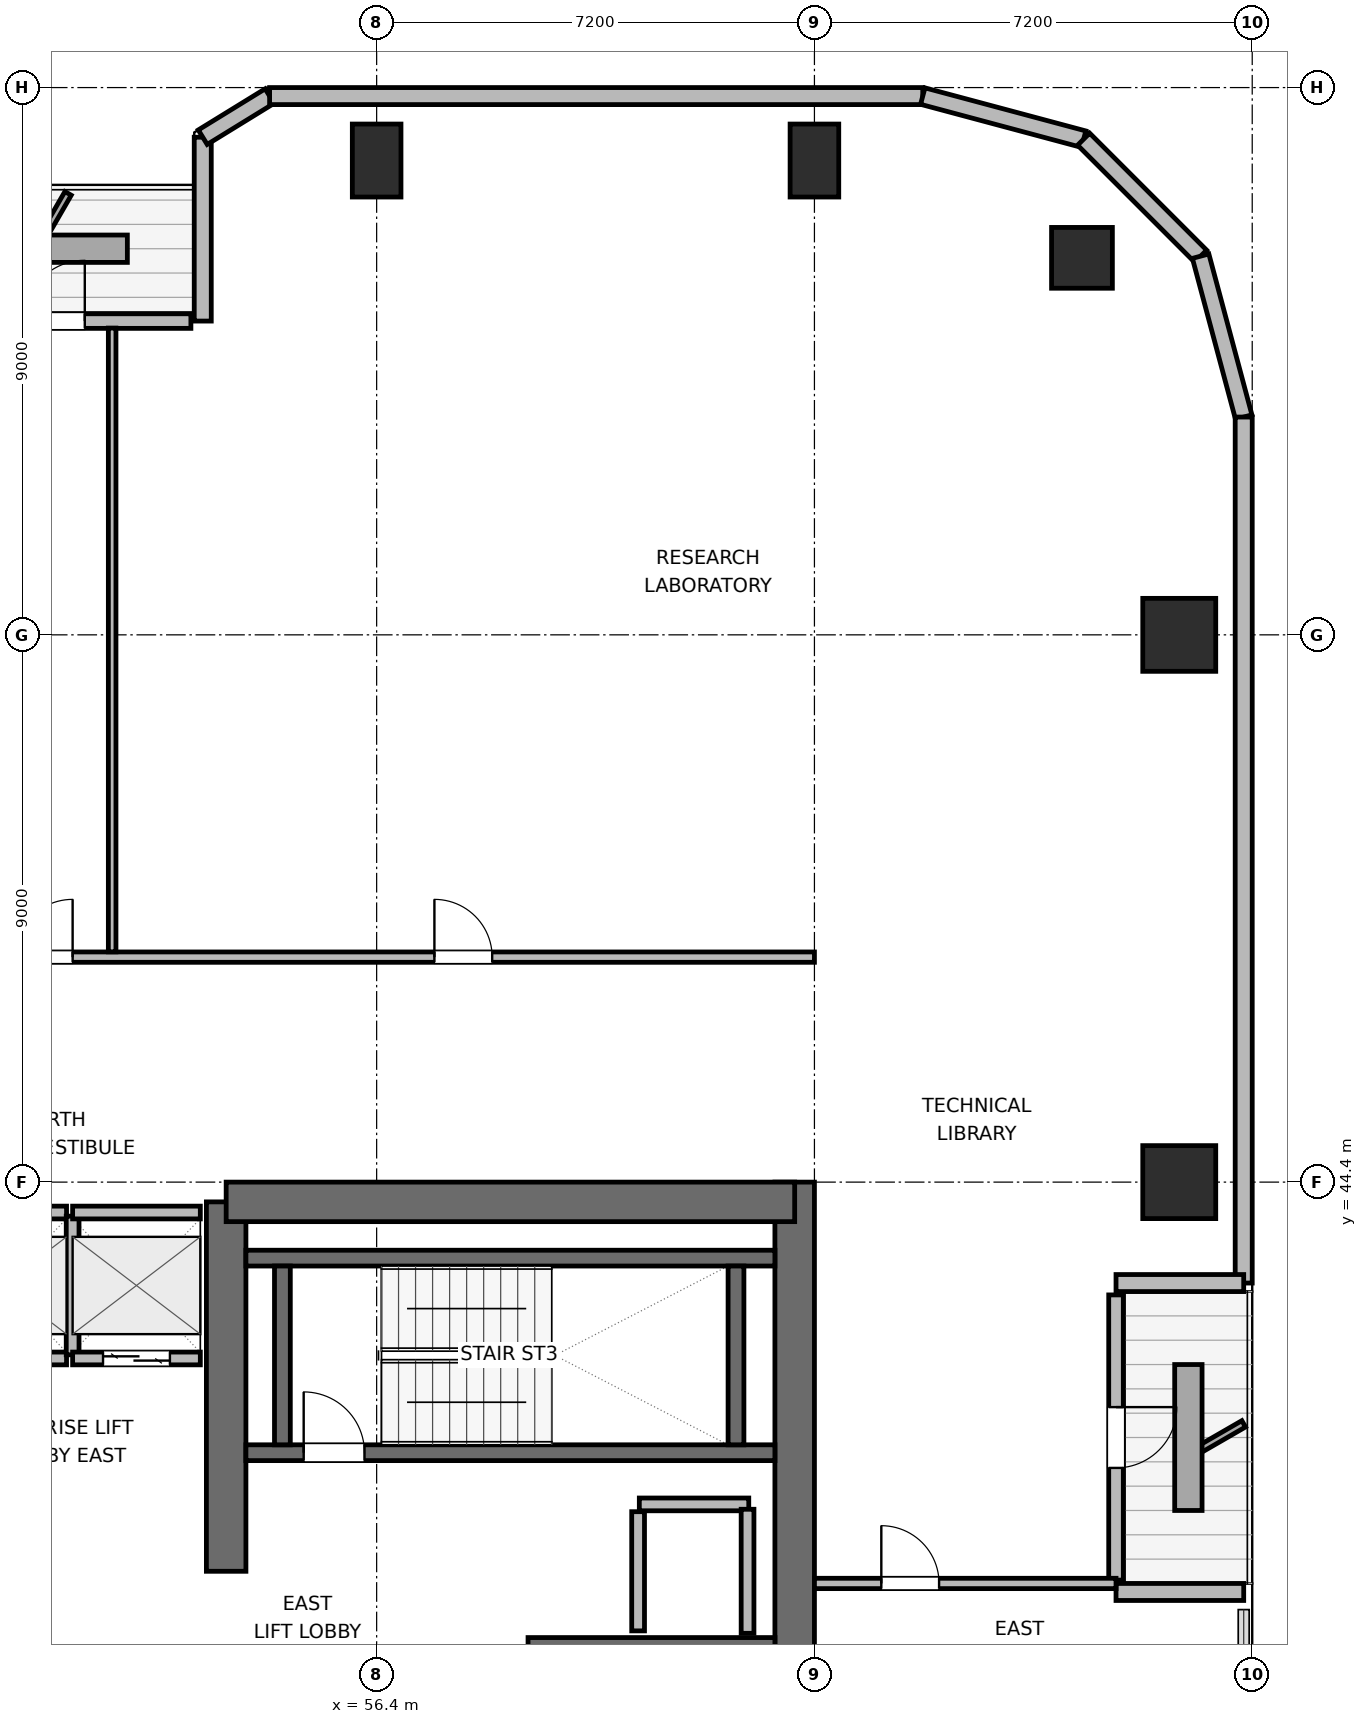
"""IFC4 building model, lengths in metres.
Left out: names, types, materials, properties, quantities, classifications, styles, units other than length and angle.
Written with IfcOpenShell. Run it as: python <this file> out.ifc"""

import sys

from ifc_helpers import new_model, si_unit, direction, frame, frame_2d, origin, origin_2d, place, context, subcontext, project, spatial, rectangle, circle, extrude, element, fill, save


model = new_model("IFC4")
c1 = context("Model", 3, precision=1e-05, world=origin(), true_north=direction((0.0, 1.0)))
c2 = subcontext(c1, "Body", "Model", "MODEL_VIEW")
j1 = project(units=[si_unit("LENGTHUNIT", "METRE"), si_unit("PLANEANGLEUNIT", "RADIAN")], contexts=[c1])
p1 = place(None, origin())
s1 = spatial("IfcSite", under=j1, at=p1, CompositionType="ELEMENT")
p2 = place(p1, origin())
s2 = spatial("IfcBuilding", under=s1, at=p2, CompositionType="ELEMENT")
p3 = place(p2, frame((0.0, 0.0, 201.9)))
s3 = spatial("IfcBuildingStorey", under=s2, at=p3, CompositionType="ELEMENT", Elevation=201.9)
p4 = place(p3, frame((53.925, 38.0, 0.0), z_axis=(0.0, 0.0, 1.0), x_axis=(0.0, 1.0, 0.0)))
e1 = element("IfcWall", 1, at=p4, inside=s3, PredefinedType="SHEAR", context=c2, shape_type="SweptSolid", body=[
    extrude(rectangle(XDim=6.075, YDim=0.65, at=frame_2d((3.038, 0.0))), origin(), (0.0, 0.0, 1.0), 3.9),
])
p5 = place(p3, frame((63.275, 27.6, 0.0), z_axis=(0.0, 0.0, 1.0), x_axis=(0.0, 1.0, 0.0)))
e2 = element("IfcWall", 2, at=p5, inside=s3, PredefinedType="SHEAR", context=c2, shape_type="SweptSolid", body=[
    extrude(rectangle(XDim=16.8, YDim=0.65, at=frame_2d((8.4, 0.0))), origin(), (0.0, 0.0, 1.0), 3.9),
])
p6 = place(p3, frame((53.925, 44.075, 0.0), z_axis=(0.0, 0.0, 1.0), x_axis=(1.0, 0.0, 0.0)))
e3 = element("IfcWall", 3, at=p6, inside=s3, PredefinedType="SHEAR", context=c2, shape_type="SweptSolid", body=[
    extrude(rectangle(XDim=9.35, YDim=0.65, at=frame_2d((4.675, 0.0))), origin(), (0.0, 0.0, 1.0), 3.9),
])
p7 = place(p3, frame((58.89, 36.78, 0.0), z_axis=(0.0, 0.0, 1.0), x_axis=(1.0, 0.0, 0.0)))
e4 = element("IfcWall", 4, at=p7, inside=s3, PredefinedType="SHEAR", context=c2, shape_type="SweptSolid", body=[
    extrude(rectangle(XDim=4.06, YDim=0.26, at=frame_2d((2.03, 0.0))), origin(), (0.0, 0.0, 1.0), 3.9),
])
p8 = place(p3, frame((54.25, 39.95, 0.0), z_axis=(0.0, 0.0, 1.0), x_axis=(1.0, 0.0, 0.0)))
e5 = element("IfcWall", 5, at=p8, inside=s3, PredefinedType="SHEAR", context=c2, shape_type="SweptSolid", body=[
    extrude(rectangle(XDim=8.7, YDim=0.26, at=frame_2d((4.35, 0.0))), origin(), (0.0, 0.0, 1.0), 3.9),
])
p9 = place(p8, frame((0.95, 0.0, 0.0)))
e6 = element("IfcOpeningElement", 6, at=p9, cuts=e5, PredefinedType="OPENING", context=c2, shape_type="SweptSolid", body=[
    extrude(rectangle(XDim=1.0, YDim=2.04, at=frame_2d((0.5, 1.02))), frame((0.0, 0.14, 0.0), z_axis=(0.0, -1.0, 0.0), x_axis=(1.0, 0.0, 0.0)), (0.0, 0.0, 1.0), 0.28),
])
p10 = place(p3, frame((54.25, 43.15, 0.0), z_axis=(0.0, 0.0, 1.0), x_axis=(1.0, 0.0, 0.0)))
e7 = element("IfcWall", 7, at=p10, inside=s3, PredefinedType="SHEAR", context=c2, shape_type="SweptSolid", body=[
    extrude(rectangle(XDim=8.7, YDim=0.26, at=frame_2d((4.35, 0.0))), origin(), (0.0, 0.0, 1.0), 3.9),
])
for number, where, z_axis, x_axis in (
    (8, (54.85, 40.08, 0.0), (0.0, 0.0, 1.0), (0.0, 1.0, 0.0)),
    (9, (62.31, 40.08, 0.0), (0.0, 0.0, 1.0), (0.0, 1.0, 0.0)),
):
    element("IfcWall", number, at=place(p3, frame(where, z_axis=z_axis, x_axis=x_axis)), inside=s3, PredefinedType="SHEAR", context=c2, shape_type="SweptSolid", body=[
        extrude(rectangle(XDim=2.94, YDim=0.26, at=frame_2d((1.47, 0.0))), origin(), (0.0, 0.0, 1.0), 3.9),
    ])
p11 = place(p3, frame((68.0, 59.6, 0.0), z_axis=(0.0, 0.0, 1.0), x_axis=(1.0, 0.0, 0.0)))
e10 = element("IfcColumn", 10, at=p11, inside=s3, PredefinedType="COLUMN", context=c2, shape_type="SweptSolid", body=[
    extrude(circle(Radius=0.5, at=origin_2d()), origin(), (0.0, 0.0, 1.0), 3.9),
])
for number, where, z_axis, x_axis in (
    (11, (56.4, 61.2, 0.0), (0.0, 0.0, 1.0), (1.0, 0.0, 0.0)),
    (12, (63.6, 61.2, 0.0), (0.0, 0.0, 1.0), (1.0, 0.0, 0.0)),
):
    element("IfcColumn", number, at=place(p3, frame(where, z_axis=z_axis, x_axis=x_axis)), inside=s3, PredefinedType="COLUMN", context=c2, shape_type="SweptSolid", body=[
        extrude(rectangle(XDim=0.8, YDim=1.2, at=origin_2d()), origin(), (0.0, 0.0, 1.0), 3.9),
    ])
for number, where, z_axis, x_axis in (
    (13, (69.6, 44.4, 0.0), (0.0, 0.0, 1.0), (1.0, 0.0, 0.0)),
    (14, (69.6, 53.4, 0.0), (0.0, 0.0, 1.0), (1.0, 0.0, 0.0)),
):
    element("IfcColumn", number, at=place(p3, frame(where, z_axis=z_axis, x_axis=x_axis)), inside=s3, PredefinedType="COLUMN", context=c2, shape_type="SweptSolid", body=[
        extrude(rectangle(XDim=1.2, YDim=1.2, at=origin_2d()), origin(), (0.0, 0.0, 1.0), 3.9),
    ])
p12 = place(p3, frame((48.855, 58.56, 0.0), z_axis=(0.0, 0.0, 1.0), x_axis=(1.0, 0.0, 0.0)))
e15 = element("IfcWall", 15, at=p12, inside=s3, PredefinedType="SOLIDWALL", context=c2, shape_type="SweptSolid", body=[
    extrude(rectangle(XDim=4.49, YDim=0.24, at=frame_2d((2.245, 0.0))), origin(), (0.0, 0.0, 1.0), 3.68),
])
p13 = place(p12, frame((1.745, 0.0, 0.0)))
e16 = element("IfcOpeningElement", 16, at=p13, cuts=e15, PredefinedType="OPENING", context=c2, shape_type="SweptSolid", body=[
    extrude(rectangle(XDim=1.0, YDim=2.02, at=frame_2d((0.5, 1.01))), frame((0.0, 0.13, 0.0), z_axis=(0.0, -1.0, 0.0), x_axis=(1.0, 0.0, 0.0)), (0.0, 0.0, 1.0), 0.26),
])
p14 = place(p3, frame((53.54, 58.56, 0.0), z_axis=(0.0, 0.0, 1.0), x_axis=(0.0, 1.0, 0.0)))
e17 = element("IfcWall", 17, at=p14, inside=s3, PredefinedType="SOLIDWALL", context=c2, shape_type="SweptSolid", body=[
    extrude(rectangle(XDim=3.024, YDim=0.28, at=frame_2d((1.512, 0.0))), origin(), (0.0, 0.0, 1.0), 2.265),
])
p15 = place(p3, frame((53.54, 61.584, 0.0), z_axis=(0.0, 0.0, 1.0), x_axis=(0.851801140441, 0.523865266212, 0.0)))
e18 = element("IfcWall", 18, at=p15, inside=s3, PredefinedType="SOLIDWALL", context=c2, shape_type="SweptSolid", body=[
    extrude(rectangle(XDim=1.291, YDim=0.28, at=frame_2d((0.646, 0.0))), origin(), (0.0, 0.0, 1.0), 3.68),
])
p16 = place(p3, frame((54.64, 62.26, 0.0), z_axis=(0.0, 0.0, 1.0), x_axis=(1.0, 0.0, 0.0)))
e19 = element("IfcWall", 19, at=p16, inside=s3, PredefinedType="SOLIDWALL", context=c2, shape_type="SweptSolid", body=[
    extrude(rectangle(XDim=10.742, YDim=0.28, at=frame_2d((5.371, 0.0))), origin(), (0.0, 0.0, 1.0), 3.68),
])
p17 = place(p3, frame((65.382, 62.26, 0.0), z_axis=(0.0, 0.0, 1.0), x_axis=(0.965971118627, -0.258649952598, 0.0)))
e20 = element("IfcWall", 20, at=p17, inside=s3, PredefinedType="SOLIDWALL", context=c2, shape_type="SweptSolid", body=[
    extrude(rectangle(XDim=2.739, YDim=0.28, at=frame_2d((1.37, 0.0))), origin(), (0.0, 0.0, 1.0), 3.68),
])
p18 = place(p3, frame((68.028, 61.552, 0.0), z_axis=(0.0, 0.0, 1.0), x_axis=(0.707061915429, -0.707151644098, 0.0)))
e21 = element("IfcWall", 21, at=p18, inside=s3, PredefinedType="SOLIDWALL", context=c2, shape_type="SweptSolid", body=[
    extrude(rectangle(XDim=2.721, YDim=0.28, at=frame_2d((1.36, 0.0))), origin(), (0.0, 0.0, 1.0), 3.68),
])
p19 = place(p3, frame((69.951, 59.627, 0.0), z_axis=(0.0, 0.0, 1.0), x_axis=(0.258672222976, -0.9659651552, 0.0)))
e22 = element("IfcWall", 22, at=p19, inside=s3, PredefinedType="SOLIDWALL", context=c2, shape_type="SweptSolid", body=[
    extrude(rectangle(XDim=2.739, YDim=0.28, at=frame_2d((1.37, 0.0))), origin(), (0.0, 0.0, 1.0), 3.68),
])
p20 = place(p3, frame((70.66, 56.982, 0.0), z_axis=(0.0, 0.0, 1.0), x_axis=(0.0, -1.0, 0.0)))
e23 = element("IfcWall", 23, at=p20, inside=s3, PredefinedType="SOLIDWALL", context=c2, shape_type="SweptSolid", body=[
    extrude(rectangle(XDim=14.242, YDim=0.28, at=frame_2d((7.121, 0.0))), origin(), (0.0, 0.0, 1.0), 3.68),
])
p21 = place(p3, frame((70.66, 42.74, 0.0), z_axis=(0.0, 0.0, 1.0), x_axis=(-1.0, 0.0, 0.0)))
e24 = element("IfcWall", 24, at=p21, inside=s3, PredefinedType="SOLIDWALL", context=c2, shape_type="SweptSolid", body=[
    extrude(rectangle(XDim=2.1, YDim=0.28, at=frame_2d((1.05, 0.0))), origin(), (0.0, 0.0, 1.0), 3.116),
])
p22 = place(p3, frame((68.56, 42.545, 0.0), z_axis=(0.0, 0.0, 1.0), x_axis=(0.0, -1.0, 0.0)))
e25 = element("IfcWall", 25, at=p22, inside=s3, PredefinedType="SOLIDWALL", context=c2, shape_type="SweptSolid", body=[
    extrude(rectangle(XDim=4.69, YDim=0.24, at=frame_2d((2.345, 0.0))), origin(), (0.0, 0.0, 1.0), 3.248),
])
p23 = place(p22, frame((1.845, 0.0, 0.0)))
e26 = element("IfcOpeningElement", 26, at=p23, cuts=e25, PredefinedType="OPENING", context=c2, shape_type="SweptSolid", body=[
    extrude(rectangle(XDim=1.0, YDim=2.02, at=frame_2d((0.5, 1.01))), frame((0.0, 0.13, 0.0), z_axis=(0.0, -1.0, 0.0), x_axis=(1.0, 0.0, 0.0)), (0.0, 0.0, 1.0), 0.26),
])
p24 = place(p3, frame((68.56, 37.66, 0.0), z_axis=(0.0, 0.0, 1.0), x_axis=(1.0, 0.0, 0.0)))
e27 = element("IfcWall", 27, at=p24, inside=s3, PredefinedType="SOLIDWALL", context=c2, shape_type="SweptSolid", body=[
    extrude(rectangle(XDim=2.1, YDim=0.28, at=frame_2d((1.05, 0.0))), origin(), (0.0, 0.0, 1.0), 3.116),
])
p25 = place(p3, frame((60.72, 39.1, 0.0), z_axis=(0.0, 0.0, 1.0), x_axis=(1.0, 0.0, 0.0)))
e28 = element("IfcWall", 28, at=p25, inside=s3, PredefinedType="PARTITIONING", context=c2, shape_type="SweptSolid", body=[
    extrude(rectangle(XDim=1.8, YDim=0.21, at=frame_2d((0.9, 0.0))), origin(), (0.0, 0.0, 1.0), 3.68),
])
p26 = place(p3, frame((60.7, 37.02, 0.0), z_axis=(0.0, 0.0, 1.0), x_axis=(0.0, 1.0, 0.0)))
e29 = element("IfcWall", 29, at=p26, inside=s3, PredefinedType="PARTITIONING", context=c2, shape_type="SweptSolid", body=[
    extrude(rectangle(XDim=1.96, YDim=0.21, at=frame_2d((0.98, 0.0))), origin(), (0.0, 0.0, 1.0), 3.68),
])
p27 = place(p3, frame((62.5, 36.98, 0.0), z_axis=(0.0, 0.0, 1.0), x_axis=(0.0, 1.0, 0.0)))
e30 = element("IfcWall", 30, at=p27, inside=s3, PredefinedType="PARTITIONING", context=c2, shape_type="SweptSolid", body=[
    extrude(rectangle(XDim=2.04, YDim=0.21, at=frame_2d((1.02, 0.0))), origin(), (0.0, 0.0, 1.0), 3.68),
])
p28 = place(p3, frame((49.2, 41.5, 0.0), z_axis=(0.0, 0.0, 1.0), x_axis=(1.0, 0.0, 0.0)))
e31 = element("IfcWall", 31, at=p28, inside=s3, PredefinedType="PARTITIONING", context=c2, shape_type="SweptSolid", body=[
    extrude(rectangle(XDim=2.1, YDim=0.21, at=frame_2d((1.05, 0.0))), origin(), (0.0, 0.0, 1.0), 3.68),
])
p29 = place(p28, frame((0.5, 0.0, 0.0)))
e32 = element("IfcOpeningElement", 32, at=p29, cuts=e31, PredefinedType="OPENING", context=c2, shape_type="SweptSolid", body=[
    extrude(rectangle(XDim=1.1, YDim=2.04, at=frame_2d((0.55, 1.02))), frame((0.0, 0.115, 0.0), z_axis=(0.0, -1.0, 0.0), x_axis=(1.0, 0.0, 0.0)), (0.0, 0.0, 1.0), 0.23),
])
p30 = place(p3, frame((49.2, 43.9, 0.0), z_axis=(0.0, 0.0, 1.0), x_axis=(1.0, 0.0, 0.0)))
e33 = element("IfcWall", 33, at=p30, inside=s3, PredefinedType="PARTITIONING", context=c2, shape_type="SweptSolid", body=[
    extrude(rectangle(XDim=2.1, YDim=0.21, at=frame_2d((1.05, 0.0))), origin(), (0.0, 0.0, 1.0), 2.765),
])
p31 = place(p3, frame((51.4, 41.56, 0.0), z_axis=(0.0, 0.0, 1.0), x_axis=(0.0, 1.0, 0.0)))
e34 = element("IfcWall", 34, at=p31, inside=s3, PredefinedType="PARTITIONING", context=c2, shape_type="SweptSolid", body=[
    extrude(rectangle(XDim=2.28, YDim=0.21, at=frame_2d((1.14, 0.0))), origin(), (0.0, 0.0, 1.0), 3.68),
])
p32 = place(p3, frame((51.4, 41.5, 0.0), z_axis=(0.0, 0.0, 1.0), x_axis=(1.0, 0.0, 0.0)))
e35 = element("IfcWall", 35, at=p32, inside=s3, PredefinedType="PARTITIONING", context=c2, shape_type="SweptSolid", body=[
    extrude(rectangle(XDim=2.1, YDim=0.21, at=frame_2d((1.05, 0.0))), origin(), (0.0, 0.0, 1.0), 3.68),
])
p33 = place(p32, frame((0.5, 0.0, 0.0)))
e36 = element("IfcOpeningElement", 36, at=p33, cuts=e35, PredefinedType="OPENING", context=c2, shape_type="SweptSolid", body=[
    extrude(rectangle(XDim=1.1, YDim=2.04, at=frame_2d((0.55, 1.02))), frame((0.0, 0.115, 0.0), z_axis=(0.0, -1.0, 0.0), x_axis=(1.0, 0.0, 0.0)), (0.0, 0.0, 1.0), 0.23),
])
p34 = place(p3, frame((51.4, 43.9, 0.0), z_axis=(0.0, 0.0, 1.0), x_axis=(1.0, 0.0, 0.0)))
e37 = element("IfcWall", 37, at=p34, inside=s3, PredefinedType="PARTITIONING", context=c2, shape_type="SweptSolid", body=[
    extrude(rectangle(XDim=2.1, YDim=0.21, at=frame_2d((1.05, 0.0))), origin(), (0.0, 0.0, 1.0), 2.765),
])
p35 = place(p3, frame((28.975, 48.1, 0.0), z_axis=(0.0, 0.0, 1.0), x_axis=(1.0, 0.0, 0.0)))
e38 = element("IfcWall", 38, at=p35, inside=s3, PredefinedType="PARTITIONING", context=c2, shape_type="SweptSolid", body=[
    extrude(rectangle(XDim=34.625, YDim=0.17, at=frame_2d((17.312, 0.0))), origin(), (0.0, 0.0, 1.0), 3.68),
])
p36 = place(p35, frame((6.832, 0.0, 0.0)))
e39 = element("IfcOpeningElement", 39, at=p36, cuts=e38, PredefinedType="OPENING", context=c2, shape_type="SweptSolid", body=[
    extrude(rectangle(XDim=0.95, YDim=2.04, at=frame_2d((0.475, 1.02))), frame((0.0, 0.095, 0.0), z_axis=(0.0, -1.0, 0.0), x_axis=(1.0, 0.0, 0.0)), (0.0, 0.0, 1.0), 0.19),
])
p37 = place(p35, frame((17.245, 0.0, 0.0)))
e40 = element("IfcOpeningElement", 40, at=p37, cuts=e38, PredefinedType="OPENING", context=c2, shape_type="SweptSolid", body=[
    extrude(rectangle(XDim=0.95, YDim=2.04, at=frame_2d((0.475, 1.02))), frame((0.0, 0.095, 0.0), z_axis=(0.0, -1.0, 0.0), x_axis=(1.0, 0.0, 0.0)), (0.0, 0.0, 1.0), 0.19),
])
p38 = place(p35, frame((21.475, 0.0, 0.0)))
e41 = element("IfcOpeningElement", 41, at=p38, cuts=e38, PredefinedType="OPENING", context=c2, shape_type="SweptSolid", body=[
    extrude(rectangle(XDim=0.95, YDim=2.04, at=frame_2d((0.475, 1.02))), frame((0.0, 0.095, 0.0), z_axis=(0.0, -1.0, 0.0), x_axis=(1.0, 0.0, 0.0)), (0.0, 0.0, 1.0), 0.19),
])
p39 = place(p35, frame((28.375, 0.0, 0.0)))
e42 = element("IfcOpeningElement", 42, at=p39, cuts=e38, PredefinedType="OPENING", context=c2, shape_type="SweptSolid", body=[
    extrude(rectangle(XDim=0.95, YDim=2.04, at=frame_2d((0.475, 1.02))), frame((0.0, 0.095, 0.0), z_axis=(0.0, -1.0, 0.0), x_axis=(1.0, 0.0, 0.0)), (0.0, 0.0, 1.0), 0.19),
])
p40 = place(p3, frame((52.05, 48.187, 0.0), z_axis=(0.0, 0.0, 1.0), x_axis=(0.0, 1.0, 0.0)))
e43 = element("IfcWall", 43, at=p40, inside=s3, PredefinedType="PARTITIONING", context=c2, shape_type="SweptSolid", body=[
    extrude(rectangle(XDim=10.258, YDim=0.125, at=frame_2d((5.129, 0.0))), origin(), (0.0, 0.0, 1.0), 3.043),
])
p41 = place(p3, frame((63.6, 37.8, 0.0), z_axis=(0.0, 0.0, 1.0), x_axis=(1.0, 0.0, 0.0)))
e44 = element("IfcWall", 44, at=p41, inside=s3, PredefinedType="PARTITIONING", context=c2, shape_type="SweptSolid", body=[
    extrude(rectangle(XDim=4.96, YDim=0.17, at=frame_2d((2.48, 0.0))), origin(), (0.0, 0.0, 1.0), 3.68),
])
p42 = place(p41, frame((1.1, 0.0, 0.0)))
e45 = element("IfcOpeningElement", 45, at=p42, cuts=e44, PredefinedType="OPENING", context=c2, shape_type="SweptSolid", body=[
    extrude(rectangle(XDim=0.95, YDim=2.04, at=frame_2d((0.475, 1.02))), frame((0.0, 0.095, 0.0), z_axis=(0.0, -1.0, 0.0), x_axis=(1.0, 0.0, 0.0)), (0.0, 0.0, 1.0), 0.19),
])
p43 = place(p13, origin())
e46 = element("IfcDoor", 46, at=p43, inside=s3, OperationType="SINGLE_SWING_RIGHT", PredefinedType="DOOR", context=c2, shape_type="SweptSolid", body=[
    extrude(rectangle(XDim=1.0, YDim=2.02, at=frame_2d((0.5, 1.01))), frame((0.0, 0.025, 0.0), z_axis=(0.0, -1.0, 0.0), x_axis=(1.0, 0.0, 0.0)), (0.0, 0.0, 1.0), 0.05),
])
fill(e16, e46)
p44 = place(p23, origin())
e47 = element("IfcDoor", 47, at=p44, inside=s3, OperationType="SINGLE_SWING_LEFT", PredefinedType="DOOR", context=c2, shape_type="SweptSolid", body=[
    extrude(rectangle(XDim=1.0, YDim=2.02, at=frame_2d((0.5, 1.01))), frame((0.0, 0.025, 0.0), z_axis=(0.0, -1.0, 0.0), x_axis=(1.0, 0.0, 0.0)), (0.0, 0.0, 1.0), 0.05),
])
fill(e26, e47)
p45 = place(p9, origin())
e48 = element("IfcDoor", 48, at=p45, inside=s3, OperationType="SINGLE_SWING_LEFT", PredefinedType="DOOR", context=c2, shape_type="SweptSolid", body=[
    extrude(rectangle(XDim=1.0, YDim=2.04, at=frame_2d((0.5, 1.02))), frame((0.0, 0.025, 0.0), z_axis=(0.0, -1.0, 0.0), x_axis=(1.0, 0.0, 0.0)), (0.0, 0.0, 1.0), 0.05),
])
fill(e6, e48)
p46 = place(p33, origin())
e49 = element("IfcDoor", 49, at=p46, inside=s3, OperationType="DOUBLE_DOOR_SLIDING", PredefinedType="DOOR", context=c2, shape_type="SweptSolid", body=[
    extrude(rectangle(XDim=1.1, YDim=2.04, at=frame_2d((0.55, 1.02))), frame((0.0, 0.025, 0.0), z_axis=(0.0, -1.0, 0.0), x_axis=(1.0, 0.0, 0.0)), (0.0, 0.0, 1.0), 0.05),
])
fill(e36, e49)
p47 = place(p38, origin())
e50 = element("IfcDoor", 50, at=p47, inside=s3, OperationType="SINGLE_SWING_RIGHT", PredefinedType="DOOR", context=c2, shape_type="SweptSolid", body=[
    extrude(rectangle(XDim=0.95, YDim=2.04, at=frame_2d((0.475, 1.02))), frame((0.0, 0.025, 0.0), z_axis=(0.0, -1.0, 0.0), x_axis=(1.0, 0.0, 0.0)), (0.0, 0.0, 1.0), 0.05),
])
fill(e41, e50)
p48 = place(p39, origin())
e51 = element("IfcDoor", 51, at=p48, inside=s3, OperationType="SINGLE_SWING_LEFT", PredefinedType="DOOR", context=c2, shape_type="SweptSolid", body=[
    extrude(rectangle(XDim=0.95, YDim=2.04, at=frame_2d((0.475, 1.02))), frame((0.0, 0.025, 0.0), z_axis=(0.0, -1.0, 0.0), x_axis=(1.0, 0.0, 0.0)), (0.0, 0.0, 1.0), 0.05),
])
fill(e42, e51)
p49 = place(p42, origin())
e52 = element("IfcDoor", 52, at=p49, inside=s3, OperationType="SINGLE_SWING_LEFT", PredefinedType="DOOR", context=c2, shape_type="SweptSolid", body=[
    extrude(rectangle(XDim=0.95, YDim=2.04, at=frame_2d((0.475, 1.02))), frame((0.0, 0.025, 0.0), z_axis=(0.0, -1.0, 0.0), x_axis=(1.0, 0.0, 0.0)), (0.0, 0.0, 1.0), 0.05),
])
fill(e45, e52)
save(model, sys.argv[1])
